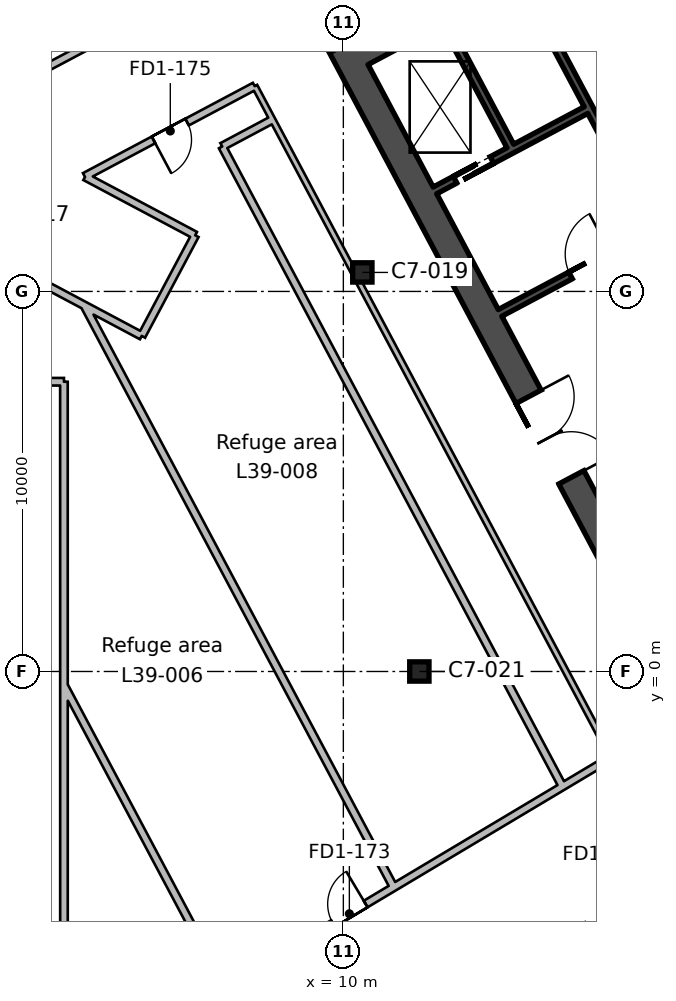
"""IFC4 building model, lengths in metres.
Left out: names, types, materials, properties, quantities, classifications, styles, units other than length and angle.
Written with IfcOpenShell. Run it as: python <this file> out.ifc"""

import sys

from ifc_helpers import new_model, si_unit, direction, frame, frame_2d, origin, origin_2d, place, context, subcontext, project, spatial, rectangle, hollow_rectangle, extrude, element, fill, save


model = new_model("IFC4")
c1 = context("Model", 3, precision=1e-05, world=origin(), true_north=direction((0.0, 1.0)))
c2 = subcontext(c1, "Body", "Model", "MODEL_VIEW")
j1 = project(units=[si_unit("LENGTHUNIT", "METRE"), si_unit("PLANEANGLEUNIT", "RADIAN")], contexts=[c1])
p1 = place(None, origin())
s1 = spatial("IfcSite", under=j1, at=p1, CompositionType="ELEMENT")
p2 = place(p1, origin())
s2 = spatial("IfcBuilding", under=s1, at=p2, CompositionType="ELEMENT")
p3 = place(p2, frame((0.0, 0.0, 183.6)))
s3 = spatial("IfcBuildingStorey", under=s2, at=p3, CompositionType="ELEMENT", Elevation=183.6)
for number, where, z_axis, x_axis in (
    (1, (12.0, 0.0, 0.0), (0.0, 0.0, 1.0), (1.0, 0.0, 0.0)),
    (2, (10.5, 10.5, 0.0), (0.0, 0.0, 1.0), (1.0, 0.0, 0.0)),
):
    element("IfcColumn", number, at=place(p3, frame(where, z_axis=z_axis, x_axis=x_axis)), inside=s3, PredefinedType="COLUMN", context=c2, shape_type="SweptSolid", body=[
        extrude(hollow_rectangle(XDim=0.508, YDim=0.508, WallThickness=0.012, InnerFilletRadius=0.006, OuterFilletRadius=0.018, at=origin_2d()), origin(), (0.0, 0.0, 1.0), 6.0),
    ])
p4 = place(p3, frame((19.215, -0.939, 0.0), z_axis=(0.0, 0.0, 1.0), x_axis=(-0.469479580143, 0.882943329908, 0.0)))
e3 = element("IfcWall", 3, at=p4, inside=s3, PredefinedType="SHEAR", context=c2, shape_type="SweptSolid", body=[
    extrude(rectangle(XDim=19.7, YDim=0.75, at=frame_2d((9.85, 0.0))), origin(), (0.0, 0.0, 1.0), 6.0),
])
p5 = place(p4, frame((6.85, 0.0, 0.0)))
e4 = element("IfcOpeningElement", 4, at=p5, cuts=e3, PredefinedType="OPENING", context=c2, shape_type="SweptSolid", body=[
    extrude(rectangle(XDim=2.4, YDim=2.4, at=frame_2d((1.2, 1.2))), frame((0.0, 0.385, 0.0), z_axis=(0.0, -1.0, 0.0), x_axis=(1.0, 0.0, 0.0)), (0.0, 0.0, 1.0), 0.77),
])
p6 = place(p3, frame((10.474, 16.3, 0.0), z_axis=(0.0, 0.0, 1.0), x_axis=(0.88295010195, 0.469466843842, 0.0)))
e5 = element("IfcWall", 5, at=p6, inside=s3, PredefinedType="SHEAR", context=c2, shape_type="SweptSolid", body=[
    extrude(rectangle(XDim=20.2, YDim=0.75, at=frame_2d((10.1, 0.0))), origin(), (0.0, 0.0, 1.0), 6.0),
])
p7 = place(p3, frame((14.394, 13.826, 0.0), z_axis=(0.0, 0.0, 1.0), x_axis=(-0.469494272526, 0.882935517501, 0.0)))
e6 = element("IfcWall", 6, at=p7, inside=s3, PredefinedType="SHEAR", context=c2, shape_type="SweptSolid", body=[
    extrude(rectangle(XDim=3.65, YDim=0.2, at=frame_2d((1.825, 0.0))), origin(), (0.0, 0.0, 1.0), 6.0),
])
p8 = place(p3, frame((18.138, 11.683, 0.0), z_axis=(0.0, 0.0, 1.0), x_axis=(-0.469480409012, 0.88294288918, 0.0)))
e7 = element("IfcWall", 7, at=p8, inside=s3, PredefinedType="SHEAR", context=c2, shape_type="SweptSolid", body=[
    extrude(rectangle(XDim=7.3, YDim=0.2, at=frame_2d((3.65, 0.0))), origin(), (0.0, 0.0, 1.0), 6.0),
])
p9 = place(p3, frame((14.124, 9.435, 0.0), z_axis=(0.0, 0.0, 1.0), x_axis=(0.882940221191, 0.469485426614, 0.0)))
e8 = element("IfcWall", 8, at=p9, inside=s3, PredefinedType="SHEAR", context=c2, shape_type="SweptSolid", body=[
    extrude(rectangle(XDim=10.0, YDim=0.2, at=frame_2d((5.0, 0.0))), origin(), (0.0, 0.0, 1.0), 6.0),
])
p10 = place(p9, frame((2.1, 0.0, 0.0)))
e9 = element("IfcOpeningElement", 9, at=p10, cuts=e8, PredefinedType="OPENING", context=c2, shape_type="SweptSolid", body=[
    extrude(rectangle(XDim=1.2, YDim=2.1, at=frame_2d((0.6, 1.05))), frame((0.0, 0.11, 0.0), z_axis=(0.0, -1.0, 0.0), x_axis=(1.0, 0.0, 0.0)), (0.0, 0.0, 1.0), 0.22),
])
p11 = place(p3, frame((12.41, 12.658, 0.0), z_axis=(0.0, 0.0, 1.0), x_axis=(0.8829484765, 0.469469900894, 0.0)))
e10 = element("IfcWall", 10, at=p11, inside=s3, PredefinedType="SHEAR", context=c2, shape_type="SweptSolid", body=[
    extrude(rectangle(XDim=4.5, YDim=0.2, at=frame_2d((2.25, 0.0))), origin(), (0.0, 0.0, 1.0), 6.0),
])
p12 = place(p11, frame((0.6, 0.0, 0.0)))
e11 = element("IfcOpeningElement", 11, at=p12, cuts=e10, PredefinedType="OPENING", context=c2, shape_type="SweptSolid", body=[
    extrude(rectangle(XDim=1.1, YDim=2.1, at=frame_2d((0.55, 1.05))), frame((0.0, 0.11, 0.0), z_axis=(0.0, -1.0, 0.0), x_axis=(1.0, 0.0, 0.0)), (0.0, 0.0, 1.0), 0.22),
])
p13 = place(p3, frame((0.0, 14.723, 0.0), z_axis=(0.0, 0.0, 1.0), x_axis=(0.882950329887, 0.469466415149, 0.0)))
e12 = element("IfcWall", 12, at=p13, inside=s3, PredefinedType="PARTITIONING", context=c2, shape_type="SweptSolid", body=[
    extrude(rectangle(XDim=49.288, YDim=0.2, at=frame_2d((24.644, 0.0))), origin(), (0.0, 0.0, 1.0), 5.55),
])
p14 = place(p13, frame((23.95, 0.0, 0.0)))
e13 = element("IfcOpeningElement", 13, at=p14, cuts=e12, PredefinedType="OPENING", context=c2, shape_type="SweptSolid", body=[
    extrude(rectangle(XDim=1.0, YDim=2.1, at=frame_2d((0.5, 1.05))), frame((0.0, 0.11, 0.0), z_axis=(0.0, -1.0, 0.0), x_axis=(1.0, 0.0, 0.0)), (0.0, 0.0, 1.0), 0.22),
])
p15 = place(p13, frame((17.95, 0.0, 0.0)))
e14 = element("IfcOpeningElement", 14, at=p15, cuts=e12, PredefinedType="OPENING", context=c2, shape_type="SweptSolid", body=[
    extrude(rectangle(XDim=1.0, YDim=2.1, at=frame_2d((0.5, 1.05))), frame((0.0, 0.11, 0.0), z_axis=(0.0, -1.0, 0.0), x_axis=(1.0, 0.0, 0.0)), (0.0, 0.0, 1.0), 0.22),
])
p16 = place(p13, frame((13.55, 0.0, 0.0)))
e15 = element("IfcOpeningElement", 15, at=p16, cuts=e12, PredefinedType="OPENING", context=c2, shape_type="SweptSolid", body=[
    extrude(rectangle(XDim=1.0, YDim=2.1, at=frame_2d((0.5, 1.05))), frame((0.0, 0.11, 0.0), z_axis=(0.0, -1.0, 0.0), x_axis=(1.0, 0.0, 0.0)), (0.0, 0.0, 1.0), 0.22),
])
p17 = place(p3, frame((2.649, -0.297, 0.0), z_axis=(0.0, 0.0, 1.0), x_axis=(-0.000123285559, 0.9999999924, 0.0)))
e16 = element("IfcWall", 16, at=p17, inside=s3, PredefinedType="PARTITIONING", context=c2, shape_type="SweptSolid", body=[
    extrude(rectangle(XDim=7.921, YDim=0.2, at=frame_2d((3.96, 0.0))), origin(), (0.0, 0.0, 1.0), 5.55),
])
p18 = place(p3, frame((-2.649, 7.624, 0.0), z_axis=(0.0, 0.0, 1.0), x_axis=(1.0, 0.0, 0.0)))
e17 = element("IfcWall", 17, at=p18, inside=s3, PredefinedType="PARTITIONING", context=c2, shape_type="SweptSolid", body=[
    extrude(rectangle(XDim=5.298, YDim=0.2, at=frame_2d((2.649, 0.0))), origin(), (0.0, 0.0, 1.0), 5.55),
])
p19 = place(p3, frame((3.186, 9.632, 0.0), z_axis=(0.0, 0.0, 1.0), x_axis=(-0.882970255793, 0.469428937524, 0.0)))
e18 = element("IfcWall", 18, at=p19, inside=s3, PredefinedType="PARTITIONING", context=c2, shape_type="SweptSolid", body=[
    extrude(rectangle(XDim=3.608, YDim=0.2, at=frame_2d((1.804, 0.0))), origin(), (0.0, 0.0, 1.0), 5.55),
])
p20 = place(p3, frame((3.184, 9.632, 0.0), z_axis=(0.0, 0.0, 1.0), x_axis=(0.469488044355, -0.882938829256, 0.0)))
e19 = element("IfcWall", 19, at=p20, inside=s3, PredefinedType="PARTITIONING", context=c2, shape_type="SweptSolid", body=[
    extrude(rectangle(XDim=17.34, YDim=0.2, at=frame_2d((8.67, 0.0))), origin(), (0.0, 0.0, 1.0), 5.55),
])
p21 = place(p3, frame((6.883, -8.329, 0.0), z_axis=(0.0, 0.0, 1.0), x_axis=(-0.469431608927, 0.882968835543, 0.0)))
e20 = element("IfcWall", 20, at=p21, inside=s3, PredefinedType="PARTITIONING", context=c2, shape_type="SweptSolid", body=[
    extrude(rectangle(XDim=9.02, YDim=0.2, at=frame_2d((4.51, 0.0))), origin(), (0.0, 0.0, 1.0), 5.55),
])
p22 = place(p3, frame((2.649, -0.297, 0.0), z_axis=(0.0, 0.0, 1.0), x_axis=(0.0, -1.0, 0.0)))
e21 = element("IfcWall", 21, at=p22, inside=s3, PredefinedType="PARTITIONING", context=c2, shape_type="SweptSolid", body=[
    extrude(rectangle(XDim=11.528, YDim=0.2, at=frame_2d((5.764, 0.0))), origin(), (0.0, 0.0, 1.0), 5.55),
])
p23 = place(p3, frame((3.195, 13.025, 0.0), z_axis=(0.0, 0.0, 1.0), x_axis=(0.882993980878, 0.469384309211, 0.0)))
e22 = element("IfcWall", 22, at=p23, inside=s3, PredefinedType="PARTITIONING", context=c2, shape_type="SweptSolid", body=[
    extrude(rectangle(XDim=5.064, YDim=0.2, at=frame_2d((2.532, 0.0))), origin(), (0.0, 0.0, 1.0), 5.55),
])
p24 = place(p23, frame((2.05, 0.0, 0.0)))
e23 = element("IfcOpeningElement", 23, at=p24, cuts=e22, PredefinedType="OPENING", context=c2, shape_type="SweptSolid", body=[
    extrude(rectangle(XDim=1.0, YDim=2.1, at=frame_2d((0.5, 1.05))), frame((0.0, 0.11, 0.0), z_axis=(0.0, -1.0, 0.0), x_axis=(1.0, 0.0, 0.0)), (0.0, 0.0, 1.0), 0.22),
])
p25 = place(p3, frame((8.136, 14.519, 0.0), z_axis=(0.0, 0.0, 1.0), x_axis=(-0.882641123357, -0.470047494791, 0.0)))
e24 = element("IfcWall", 24, at=p25, inside=s3, PredefinedType="PARTITIONING", context=c2, shape_type="SweptSolid", body=[
    extrude(rectangle(XDim=1.5, YDim=0.2, at=frame_2d((0.75, 0.0))), origin(), (0.0, 0.0, 1.0), 5.55),
])
p26 = place(p3, frame((6.812, 13.814, 0.0), z_axis=(0.0, 0.0, 1.0), x_axis=(0.46951956429, -0.882922068333, 0.0)))
e25 = element("IfcWall", 25, at=p26, inside=s3, PredefinedType="PARTITIONING", context=c2, shape_type="SweptSolid", body=[
    extrude(rectangle(XDim=19.073, YDim=0.2, at=frame_2d((9.536, 0.0))), origin(), (0.0, 0.0, 1.0), 5.55),
])
p27 = place(p3, frame((3.206, 13.019, 0.0), z_axis=(0.0, 0.0, 1.0), x_axis=(0.882863200263, -0.469630247772, 0.0)))
e26 = element("IfcWall", 26, at=p27, inside=s3, PredefinedType="PARTITIONING", context=c2, shape_type="SweptSolid", body=[
    extrude(rectangle(XDim=3.281, YDim=0.2, at=frame_2d((1.641, 0.0))), origin(), (0.0, 0.0, 1.0), 5.55),
])
p28 = place(p3, frame((6.103, 11.478, 0.0), z_axis=(0.0, 0.0, 1.0), x_axis=(-0.469341661158, -0.883016650523, 0.0)))
e27 = element("IfcWall", 27, at=p28, inside=s3, PredefinedType="PARTITIONING", context=c2, shape_type="SweptSolid", body=[
    extrude(rectangle(XDim=3.0, YDim=0.2, at=frame_2d((1.5, 0.0))), origin(), (0.0, 0.0, 1.0), 5.55),
])
p29 = place(p3, frame((4.695, 8.829, 0.0), z_axis=(0.0, 0.0, 1.0), x_axis=(-0.882799303078, 0.469750349106, 0.0)))
e28 = element("IfcWall", 28, at=p29, inside=s3, PredefinedType="PARTITIONING", context=c2, shape_type="SweptSolid", body=[
    extrude(rectangle(XDim=1.709, YDim=0.2, at=frame_2d((0.855, 0.0))), origin(), (0.0, 0.0, 1.0), 5.55),
])
p30 = place(p3, frame((3.246, -10.501, 0.0), z_axis=(0.0, 0.0, 1.0), x_axis=(0.858642651925, 0.512574673872, 0.0)))
e29 = element("IfcWall", 29, at=p30, inside=s3, PredefinedType="PARTITIONING", context=c2, shape_type="SweptSolid", body=[
    extrude(rectangle(XDim=16.083, YDim=0.2, at=frame_2d((8.042, 0.0))), origin(), (0.0, 0.0, 1.0), 5.55),
])
p31 = place(p30, frame((7.55, 0.0, 0.0)))
e30 = element("IfcOpeningElement", 30, at=p31, cuts=e29, PredefinedType="OPENING", context=c2, shape_type="SweptSolid", body=[
    extrude(rectangle(XDim=1.0, YDim=2.1, at=frame_2d((0.5, 1.05))), frame((0.0, 0.11, 0.0), z_axis=(0.0, -1.0, 0.0), x_axis=(1.0, 0.0, 0.0)), (0.0, 0.0, 1.0), 0.22),
])
p32 = place(p3, frame((17.056, -2.257, 0.0), z_axis=(0.0, 0.0, 1.0), x_axis=(-0.469446756585, 0.882960782103, 0.0)))
e31 = element("IfcWall", 31, at=p32, inside=s3, PredefinedType="PARTITIONING", context=c2, shape_type="SweptSolid", body=[
    extrude(rectangle(XDim=20.0, YDim=0.15, at=frame_2d((10.0, 0.0))), origin(), (0.0, 0.0, 1.0), 5.55),
])
p33 = place(p3, frame((48.518, 10.994, 0.0), z_axis=(0.0, 0.0, 1.0), x_axis=(-0.876059599613, -0.482202838986, 0.0)))
e32 = element("IfcWall", 32, at=p33, inside=s3, PredefinedType="PARTITIONING", context=c2, shape_type="SweptSolid", body=[
    extrude(rectangle(XDim=41.2, YDim=0.2, at=frame_2d((20.6, 0.0))), origin(), (0.0, 0.0, 1.0), 5.55),
])
p34 = place(p33, frame((35.651, 0.0, 0.0)))
e33 = element("IfcOpeningElement", 33, at=p34, cuts=e32, PredefinedType="OPENING", context=c2, shape_type="SweptSolid", body=[
    extrude(rectangle(XDim=1.0, YDim=2.1, at=frame_2d((0.5, 1.05))), frame((0.0, 0.11, 0.0), z_axis=(0.0, -1.0, 0.0), x_axis=(1.0, 0.0, 0.0)), (0.0, 0.0, 1.0), 0.22),
])
p35 = place(p33, frame((25.35, 0.0, 0.0)))
e34 = element("IfcOpeningElement", 34, at=p35, cuts=e32, PredefinedType="OPENING", context=c2, shape_type="SweptSolid", body=[
    extrude(rectangle(XDim=1.0, YDim=2.1, at=frame_2d((0.5, 1.05))), frame((0.0, 0.11, 0.0), z_axis=(0.0, -1.0, 0.0), x_axis=(1.0, 0.0, 0.0)), (0.0, 0.0, 1.0), 0.22),
])
p36 = place(p33, frame((20.151, 0.0, 0.0)))
e35 = element("IfcOpeningElement", 35, at=p36, cuts=e32, PredefinedType="OPENING", context=c2, shape_type="SweptSolid", body=[
    extrude(rectangle(XDim=1.0, YDim=2.1, at=frame_2d((0.5, 1.05))), frame((0.0, 0.11, 0.0), z_axis=(0.0, -1.0, 0.0), x_axis=(1.0, 0.0, 0.0)), (0.0, 0.0, 1.0), 0.22),
])
p37 = place(p33, frame((18.55, 0.0, 0.0)))
e36 = element("IfcOpeningElement", 36, at=p37, cuts=e32, PredefinedType="OPENING", context=c2, shape_type="SweptSolid", body=[
    extrude(rectangle(XDim=1.0, YDim=2.1, at=frame_2d((0.5, 1.05))), frame((0.0, 0.11, 0.0), z_axis=(0.0, -1.0, 0.0), x_axis=(1.0, 0.0, 0.0)), (0.0, 0.0, 1.0), 0.22),
])
p38 = place(p5, frame((2.4, 0.0, 0.0), z_axis=(0.0, 0.0, 1.0), x_axis=(-1.0, 0.0, 0.0)))
e37 = element("IfcDoor", 37, at=p38, inside=s3, OperationType="DOUBLE_DOOR_SINGLE_SWING", PredefinedType="DOOR", context=c2, shape_type="SweptSolid", body=[
    extrude(rectangle(XDim=2.4, YDim=2.4, at=frame_2d((1.2, 1.2))), frame((0.0, 0.025, 0.0), z_axis=(0.0, -1.0, 0.0), x_axis=(1.0, 0.0, 0.0)), (0.0, 0.0, 1.0), 0.05),
])
fill(e4, e37)
p39 = place(p10, origin())
e38 = element("IfcDoor", 38, at=p39, inside=s3, OperationType="SINGLE_SWING_RIGHT", PredefinedType="DOOR", context=c2, shape_type="SweptSolid", body=[
    extrude(rectangle(XDim=1.2, YDim=2.1, at=frame_2d((0.6, 1.05))), frame((0.0, 0.025, 0.0), z_axis=(0.0, -1.0, 0.0), x_axis=(1.0, 0.0, 0.0)), (0.0, 0.0, 1.0), 0.05),
])
fill(e9, e38)
p40 = place(p12, origin())
e39 = element("IfcDoor", 39, at=p40, inside=s3, OperationType="DOUBLE_DOOR_SLIDING", PredefinedType="DOOR", context=c2, shape_type="SweptSolid", body=[
    extrude(rectangle(XDim=1.1, YDim=2.1, at=frame_2d((0.55, 1.05))), frame((0.0, 0.025, 0.0), z_axis=(0.0, -1.0, 0.0), x_axis=(1.0, 0.0, 0.0)), (0.0, 0.0, 1.0), 0.05),
])
fill(e11, e39)
p41 = place(p31, origin())
e40 = element("IfcDoor", 40, at=p41, inside=s3, OperationType="SINGLE_SWING_RIGHT", PredefinedType="DOOR", context=c2, shape_type="SweptSolid", body=[
    extrude(rectangle(XDim=1.0, YDim=2.1, at=frame_2d((0.5, 1.05))), frame((0.0, 0.025, 0.0), z_axis=(0.0, -1.0, 0.0), x_axis=(1.0, 0.0, 0.0)), (0.0, 0.0, 1.0), 0.05),
])
fill(e30, e40)
p42 = place(p34, origin())
e41 = element("IfcDoor", 41, at=p42, inside=s3, OperationType="SINGLE_SWING_LEFT", PredefinedType="DOOR", context=c2, shape_type="SweptSolid", body=[
    extrude(rectangle(XDim=1.0, YDim=2.1, at=frame_2d((0.5, 1.05))), frame((0.0, 0.025, 0.0), z_axis=(0.0, -1.0, 0.0), x_axis=(1.0, 0.0, 0.0)), (0.0, 0.0, 1.0), 0.05),
])
fill(e33, e41)
p43 = place(p24, frame((1.0, 0.0, 0.0), z_axis=(0.0, 0.0, 1.0), x_axis=(-1.0, 0.0, 0.0)))
e42 = element("IfcDoor", 42, at=p43, inside=s3, OperationType="SINGLE_SWING_RIGHT", PredefinedType="DOOR", context=c2, shape_type="SweptSolid", body=[
    extrude(rectangle(XDim=1.0, YDim=2.1, at=frame_2d((0.5, 1.05))), frame((0.0, 0.025, 0.0), z_axis=(0.0, -1.0, 0.0), x_axis=(1.0, 0.0, 0.0)), (0.0, 0.0, 1.0), 0.05),
])
fill(e23, e42)
save(model, sys.argv[1])
